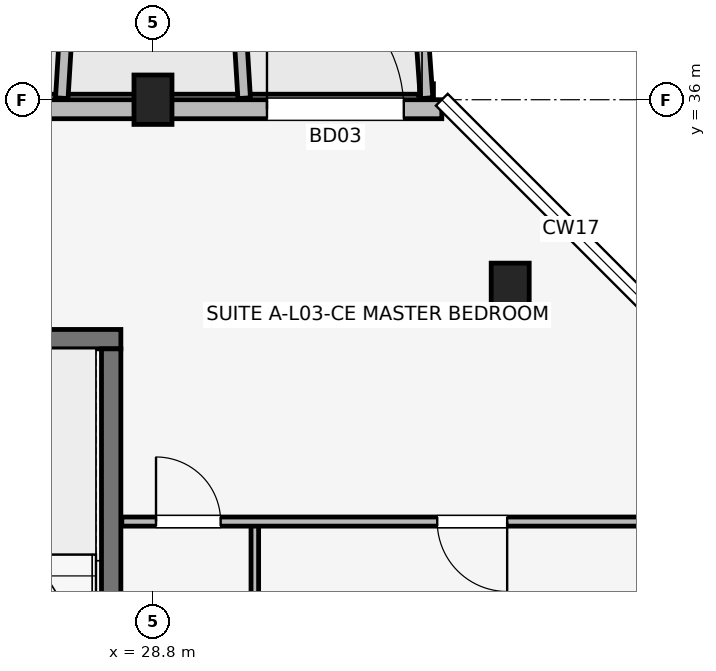
"""IFC4 building model, lengths in metres.
Left out: names, types, materials, properties, quantities, classifications, styles, units other than length and angle.
Written with IfcOpenShell. Run it as: python <this file> out.ifc"""

import sys

from ifc_helpers import new_model, si_unit, direction, frame, frame_2d, origin, origin_2d, place, context, subcontext, project, spatial, rectangle, extrude, element, fill, save


model = new_model("IFC4")
c1 = context("Model", 3, precision=1e-05, world=origin(), true_north=direction((0.0, 1.0)))
c2 = subcontext(c1, "Body", "Model", "MODEL_VIEW")
j1 = project(units=[si_unit("LENGTHUNIT", "METRE"), si_unit("PLANEANGLEUNIT", "RADIAN")], contexts=[c1])
p1 = place(None, origin())
s1 = spatial("IfcSite", under=j1, at=p1, CompositionType="ELEMENT")
p2 = place(p1, origin())
s2 = spatial("IfcBuilding", under=s1, at=p2, CompositionType="ELEMENT")
p3 = place(p2, frame((0.0, 0.0, 11.85)))
s3 = spatial("IfcBuildingStorey", under=s2, at=p3, CompositionType="ELEMENT", Elevation=11.85)
p4 = place(p3, frame((28.8, 36.0, 0.0), z_axis=(0.0, 0.0, 1.0), x_axis=(1.0, 0.0, 0.0)))
e1 = element("IfcColumn", 1, at=p4, inside=s3, PredefinedType="COLUMN", context=c2, shape_type="SweptSolid", body=[
    extrude(rectangle(XDim=0.5, YDim=0.65, at=origin_2d()), origin(), (0.0, 0.0, 1.0), 3.15),
])
p5 = place(p3, frame((33.5, 33.5, 0.0), z_axis=(0.0, 0.0, 1.0), x_axis=(1.0, 0.0, 0.0)))
e2 = element("IfcColumn", 2, at=p5, inside=s3, PredefinedType="COLUMN", context=c2, shape_type="SweptSolid", body=[
    extrude(rectangle(XDim=0.5, YDim=0.7, at=origin_2d()), origin(), (0.0, 0.0, 1.0), 3.15),
])
p6 = place(p3, frame((25.073, 32.85, 0.0), z_axis=(0.0, 0.0, 1.0), x_axis=(1.0, 0.0, 0.0)))
e3 = element("IfcWall", 3, at=p6, inside=s3, PredefinedType="SHEAR", context=c2, shape_type="SweptSolid", body=[
    extrude(rectangle(XDim=3.305, YDim=0.255, at=frame_2d((1.652, 0.0))), origin(), (0.0, 0.0, 1.0), 3.15),
])
p7 = place(p3, frame((28.25, 26.427, 0.0), z_axis=(0.0, 0.0, 1.0), x_axis=(0.0, 1.0, 0.0)))
e4 = element("IfcWall", 4, at=p7, inside=s3, PredefinedType="SHEAR", context=c2, shape_type="SweptSolid", body=[
    extrude(rectangle(XDim=6.295, YDim=0.255, at=frame_2d((3.147, 0.0))), origin(), (0.0, 0.0, 1.0), 3.15),
])
p8 = place(p3, frame((32.6, 35.875, 0.0), z_axis=(0.0, 0.0, 1.0), x_axis=(-1.0, 0.0, 0.0)))
e5 = element("IfcWall", 5, at=p8, inside=s3, PredefinedType="SOLIDWALL", context=c2, shape_type="SweptSolid", body=[
    extrude(rectangle(XDim=29.2, YDim=0.25, at=frame_2d((14.6, 0.0))), origin(), (0.0, 0.0, 1.0), 2.43),
])
p9 = place(p8, frame((28.625, 0.0, 0.0), z_axis=(0.0, 0.0, 1.0), x_axis=(-1.0, 0.0, 0.0)))
e6 = element("IfcOpeningElement", 6, at=p9, cuts=e5, PredefinedType="OPENING", context=c2, shape_type="SweptSolid", body=[
    extrude(rectangle(XDim=1.65, YDim=2.15, at=frame_2d((0.825, 1.075))), frame((0.0, 0.135, 0.0), z_axis=(0.0, -1.0, 0.0), x_axis=(1.0, 0.0, 0.0)), (0.0, 0.0, 1.0), 0.27),
])
p10 = place(p8, frame((2.3, 0.0, 0.0), z_axis=(0.0, 0.0, 1.0), x_axis=(-1.0, 0.0, 0.0)))
e7 = element("IfcOpeningElement", 7, at=p10, cuts=e5, PredefinedType="OPENING", context=c2, shape_type="SweptSolid", body=[
    extrude(rectangle(XDim=1.8, YDim=2.15, at=frame_2d((0.9, 1.075))), frame((0.0, 0.135, 0.0), z_axis=(0.0, -1.0, 0.0), x_axis=(1.0, 0.0, 0.0)), (0.0, 0.0, 1.0), 0.27),
])
p11 = place(p8, frame((15.03, 0.0, 0.5)))
e8 = element("IfcOpeningElement", 8, at=p11, cuts=e5, PredefinedType="OPENING", context=c2, shape_type="SweptSolid", body=[
    extrude(rectangle(XDim=0.75, YDim=1.75, at=frame_2d((0.375, 0.875))), frame((0.0, 0.135, 0.0), z_axis=(0.0, -1.0, 0.0), x_axis=(1.0, 0.0, 0.0)), (0.0, 0.0, 1.0), 0.27),
])
p12 = place(p8, frame((7.675, 0.0, 0.67)))
e9 = element("IfcOpeningElement", 9, at=p12, cuts=e5, PredefinedType="OPENING", context=c2, shape_type="SweptSolid", body=[
    extrude(rectangle(XDim=2.0, YDim=1.65, at=frame_2d((1.0, 0.825))), frame((0.0, 0.135, 0.0), z_axis=(0.0, -1.0, 0.0), x_axis=(1.0, 0.0, 0.0)), (0.0, 0.0, 1.0), 0.27),
])
p13 = place(p8, frame((19.57, 0.0, 0.7)))
e10 = element("IfcOpeningElement", 10, at=p13, cuts=e5, PredefinedType="OPENING", context=c2, shape_type="SweptSolid", body=[
    extrude(rectangle(XDim=1.86, YDim=1.6, at=frame_2d((0.93, 0.8))), frame((0.0, 0.135, 0.0), z_axis=(0.0, -1.0, 0.0), x_axis=(1.0, 0.0, 0.0)), (0.0, 0.0, 1.0), 0.27),
])
p14 = place(p3, frame((27.6, 36.02, 0.0), z_axis=(0.0, 0.0, 1.0), x_axis=(0.061046865508, 0.998134900808, 0.0)))
e11 = element("IfcWall", 11, at=p14, inside=s3, PredefinedType="ELEMENTEDWALL", context=c2, shape_type="SweptSolid", body=[
    extrude(rectangle(XDim=1.964, YDim=0.165, at=frame_2d((0.982, 0.0))), origin(), (0.0, 0.0, 1.0), 2.53),
])
p15 = place(p3, frame((30.0, 36.02, 0.0), z_axis=(0.0, 0.0, 1.0), x_axis=(-0.061170732449, 0.998127317276, 0.0)))
e12 = element("IfcWall", 12, at=p15, inside=s3, PredefinedType="ELEMENTEDWALL", context=c2, shape_type="SweptSolid", body=[
    extrude(rectangle(XDim=1.964, YDim=0.165, at=frame_2d((0.982, 0.0))), origin(), (0.0, 0.0, 1.0), 2.95),
])
p16 = place(p3, frame((32.4, 36.02, 0.0), z_axis=(0.0, 0.0, 1.0), x_axis=(-0.071194071069, 0.997462482625, 0.0)))
e13 = element("IfcWall", 13, at=p16, inside=s3, PredefinedType="ELEMENTEDWALL", context=c2, shape_type="SweptSolid", body=[
    extrude(rectangle(XDim=1.965, YDim=0.165, at=frame_2d((0.982, 0.0))), origin(), (0.0, 0.0, 1.0), 2.95),
])
p17 = place(p3, frame((30.14, 26.1, 0.0), z_axis=(0.0, 0.0, 1.0), x_axis=(0.0, 1.0, 0.0)))
e14 = element("IfcWall", 14, at=p17, inside=s3, PredefinedType="PARTITIONING", context=c2, shape_type="SweptSolid", body=[
    extrude(rectangle(XDim=4.35, YDim=0.1, at=frame_2d((2.175, 0.0))), origin(), (0.0, 0.0, 1.0), 2.375),
])
p18 = place(p3, frame((28.39, 30.45, 0.0), z_axis=(0.0, 0.0, 1.0), x_axis=(1.0, 0.0, 0.0)))
e15 = element("IfcWall", 15, at=p18, inside=s3, PredefinedType="PARTITIONING", context=c2, shape_type="SweptSolid", body=[
    extrude(rectangle(XDim=7.47, YDim=0.12, at=frame_2d((3.735, 0.0))), origin(), (0.0, 0.0, 1.0), 2.38),
])
p19 = place(p18, frame((0.45, 0.0, 0.0)))
e16 = element("IfcOpeningElement", 16, at=p19, cuts=e15, PredefinedType="OPENING", context=c2, shape_type="SweptSolid", body=[
    extrude(rectangle(XDim=0.85, YDim=2.08, at=frame_2d((0.425, 1.04))), frame((0.0, 0.07, 0.0), z_axis=(0.0, -1.0, 0.0), x_axis=(1.0, 0.0, 0.0)), (0.0, 0.0, 1.0), 0.14),
])
p20 = place(p18, frame((5.07, 0.0, 0.0), z_axis=(0.0, 0.0, 1.0), x_axis=(-1.0, 0.0, 0.0)))
e17 = element("IfcOpeningElement", 17, at=p20, cuts=e15, PredefinedType="OPENING", context=c2, shape_type="SweptSolid", body=[
    extrude(rectangle(XDim=0.92, YDim=2.08, at=frame_2d((0.46, 1.04))), frame((0.0, 0.07, 0.0), z_axis=(0.0, -1.0, 0.0), x_axis=(1.0, 0.0, 0.0)), (0.0, 0.0, 1.0), 0.14),
])
p21 = place(p10, origin())
e18 = element("IfcDoor", 18, at=p21, inside=s3, OperationType="SINGLE_SWING_RIGHT", PredefinedType="DOOR", context=c2, shape_type="SweptSolid", body=[
    extrude(rectangle(XDim=1.8, YDim=2.15, at=frame_2d((0.9, 1.075))), frame((0.0, 0.025, 0.0), z_axis=(0.0, -1.0, 0.0), x_axis=(1.0, 0.0, 0.0)), (0.0, 0.0, 1.0), 0.05),
])
fill(e7, e18)
p22 = place(p19, origin())
e19 = element("IfcDoor", 19, at=p22, inside=s3, OperationType="SINGLE_SWING_LEFT", PredefinedType="DOOR", context=c2, shape_type="SweptSolid", body=[
    extrude(rectangle(XDim=0.85, YDim=2.08, at=frame_2d((0.425, 1.04))), frame((0.0, 0.025, 0.0), z_axis=(0.0, -1.0, 0.0), x_axis=(1.0, 0.0, 0.0)), (0.0, 0.0, 1.0), 0.05),
])
fill(e16, e19)
p23 = place(p20, origin())
e20 = element("IfcDoor", 20, at=p23, inside=s3, OperationType="SINGLE_SWING_RIGHT", PredefinedType="DOOR", context=c2, shape_type="SweptSolid", body=[
    extrude(rectangle(XDim=0.92, YDim=2.08, at=frame_2d((0.46, 1.04))), frame((0.0, 0.025, 0.0), z_axis=(0.0, -1.0, 0.0), x_axis=(1.0, 0.0, 0.0)), (0.0, 0.0, 1.0), 0.05),
])
fill(e17, e20)
save(model, sys.argv[1])
